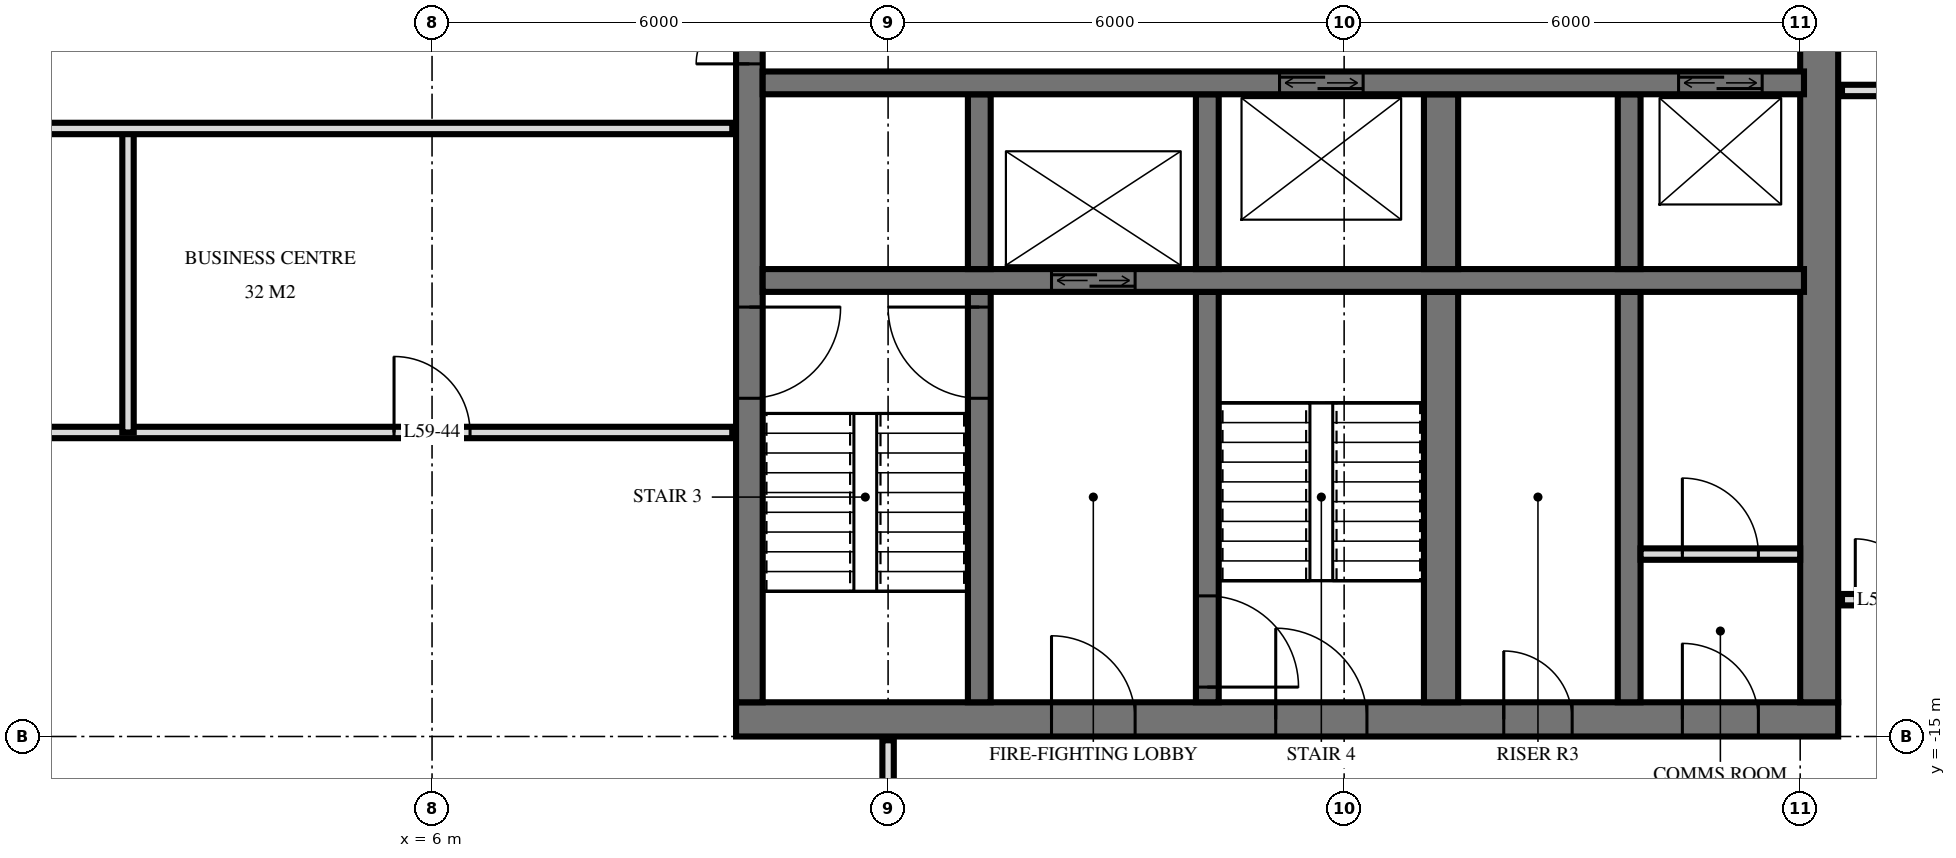
"""IFC4 building model, lengths in metres.
Left out: names, types, materials, properties, quantities, classifications, styles, units other than length and angle.
Written with IfcOpenShell. Run it as: python <this file> out.ifc"""

import sys

from ifc_helpers import new_model, si_unit, direction, frame, frame_2d, origin, place, context, subcontext, project, spatial, rectangle, extrude, element, fill, save


model = new_model("IFC4")
c1 = context("Model", 3, precision=1e-05, world=origin(), true_north=direction((0.0, 1.0)))
c2 = subcontext(c1, "Body", "Model", "MODEL_VIEW")
j1 = project(units=[si_unit("LENGTHUNIT", "METRE"), si_unit("PLANEANGLEUNIT", "RADIAN")], contexts=[c1])
p1 = place(None, origin())
s1 = spatial("IfcSite", under=j1, at=p1, CompositionType="ELEMENT")
p2 = place(p1, origin())
s2 = spatial("IfcBuilding", under=s1, at=p2, CompositionType="ELEMENT")
p3 = place(p2, frame((0.0, 0.0, 225.6)))
s3 = spatial("IfcBuildingStorey", under=s2, at=p3, CompositionType="ELEMENT", Elevation=225.6)
p4 = place(p3, frame((10.0, -14.775, 0.0), z_axis=(0.0, 0.0, 1.0), x_axis=(1.0, 0.0, 0.0)))
e1 = element("IfcWall", 1, at=p4, inside=s3, PredefinedType="SHEAR", context=c2, shape_type="SweptSolid", body=[
    extrude(rectangle(XDim=14.5, YDim=0.45, at=frame_2d((7.25, 0.0))), origin(), (0.0, 0.0, 1.0), 3.5),
])
p5 = place(p4, frame((7.1, 0.0, 0.0)))
e2 = element("IfcOpeningElement", 2, at=p5, cuts=e1, PredefinedType="OPENING", context=c2, shape_type="SweptSolid", body=[
    extrude(rectangle(XDim=1.2, YDim=2.1, at=frame_2d((0.6, 1.05))), frame((0.0, 0.235, 0.0), z_axis=(0.0, -1.0, 0.0), x_axis=(1.0, 0.0, 0.0)), (0.0, 0.0, 1.0), 0.47),
])
p6 = place(p4, frame((4.15, 0.0, 0.0)))
e3 = element("IfcOpeningElement", 3, at=p6, cuts=e1, PredefinedType="OPENING", context=c2, shape_type="SweptSolid", body=[
    extrude(rectangle(XDim=1.1, YDim=2.1, at=frame_2d((0.55, 1.05))), frame((0.0, 0.235, 0.0), z_axis=(0.0, -1.0, 0.0), x_axis=(1.0, 0.0, 0.0)), (0.0, 0.0, 1.0), 0.47),
])
p7 = place(p4, frame((10.1, 0.0, 0.0)))
e4 = element("IfcOpeningElement", 4, at=p7, cuts=e1, PredefinedType="OPENING", context=c2, shape_type="SweptSolid", body=[
    extrude(rectangle(XDim=0.9, YDim=2.1, at=frame_2d((0.45, 1.05))), frame((0.0, 0.235, 0.0), z_axis=(0.0, -1.0, 0.0), x_axis=(1.0, 0.0, 0.0)), (0.0, 0.0, 1.0), 0.47),
])
p8 = place(p4, frame((12.45, 0.0, 0.0)))
e5 = element("IfcOpeningElement", 5, at=p8, cuts=e1, PredefinedType="OPENING", context=c2, shape_type="SweptSolid", body=[
    extrude(rectangle(XDim=1.0, YDim=2.1, at=frame_2d((0.5, 1.05))), frame((0.0, 0.235, 0.0), z_axis=(0.0, -1.0, 0.0), x_axis=(1.0, 0.0, 0.0)), (0.0, 0.0, 1.0), 0.47),
])
p9 = place(p3, frame((10.175, -14.55, 0.0), z_axis=(0.0, 0.0, 1.0), x_axis=(0.0, 1.0, 0.0)))
e6 = element("IfcWall", 6, at=p9, inside=s3, PredefinedType="SHEAR", context=c2, shape_type="SweptSolid", body=[
    extrude(rectangle(XDim=14.1, YDim=0.35, at=frame_2d((7.05, 0.0))), origin(), (0.0, 0.0, 1.0), 3.5),
])
p10 = place(p9, frame((8.4, 0.0, 0.0)))
e7 = element("IfcOpeningElement", 7, at=p10, cuts=e6, PredefinedType="OPENING", context=c2, shape_type="SweptSolid", body=[
    extrude(rectangle(XDim=1.4, YDim=2.4, at=frame_2d((0.7, 1.2))), frame((0.0, 0.185, 0.0), z_axis=(0.0, -1.0, 0.0), x_axis=(1.0, 0.0, 0.0)), (0.0, 0.0, 1.0), 0.37),
])
p11 = place(p9, frame((10.0, 0.0, 0.0)))
e8 = element("IfcOpeningElement", 8, at=p11, cuts=e6, PredefinedType="OPENING", context=c2, shape_type="SweptSolid", body=[
    extrude(rectangle(XDim=1.4, YDim=2.4, at=frame_2d((0.7, 1.2))), frame((0.0, 0.185, 0.0), z_axis=(0.0, -1.0, 0.0), x_axis=(1.0, 0.0, 0.0)), (0.0, 0.0, 1.0), 0.37),
])
p12 = place(p9, frame((4.0, 0.0, 0.0)))
e9 = element("IfcOpeningElement", 9, at=p12, cuts=e6, PredefinedType="OPENING", context=c2, shape_type="SweptSolid", body=[
    extrude(rectangle(XDim=1.2, YDim=2.1, at=frame_2d((0.6, 1.05))), frame((0.0, 0.185, 0.0), z_axis=(0.0, -1.0, 0.0), x_axis=(1.0, 0.0, 0.0)), (0.0, 0.0, 1.0), 0.37),
])
p13 = place(p3, frame((24.25, -14.55, 0.0), z_axis=(0.0, 0.0, 1.0), x_axis=(0.0, 1.0, 0.0)))
e10 = element("IfcWall", 10, at=p13, inside=s3, PredefinedType="SHEAR", context=c2, shape_type="SweptSolid", body=[
    extrude(rectangle(XDim=14.1, YDim=0.5, at=frame_2d((7.05, 0.0))), origin(), (0.0, 0.0, 1.0), 3.5),
])
p14 = place(p3, frame((10.35, -6.4, 0.0), z_axis=(0.0, 0.0, 1.0), x_axis=(1.0, 0.0, 0.0)))
e11 = element("IfcWall", 11, at=p14, inside=s3, PredefinedType="SHEAR", context=c2, shape_type="SweptSolid", body=[
    extrude(rectangle(XDim=13.7, YDim=0.3, at=frame_2d((6.85, 0.0))), origin(), (0.0, 0.0, 1.0), 3.5),
])
p15 = place(p14, frame((12.05, 0.0, 0.0)))
e12 = element("IfcOpeningElement", 12, at=p15, cuts=e11, PredefinedType="OPENING", context=c2, shape_type="SweptSolid", body=[
    extrude(rectangle(XDim=1.1, YDim=2.1, at=frame_2d((0.55, 1.05))), frame((0.0, 0.16, 0.0), z_axis=(0.0, -1.0, 0.0), x_axis=(1.0, 0.0, 0.0)), (0.0, 0.0, 1.0), 0.32),
])
p16 = place(p14, frame((6.8, 0.0, 0.0)))
e13 = element("IfcOpeningElement", 13, at=p16, cuts=e11, PredefinedType="OPENING", context=c2, shape_type="SweptSolid", body=[
    extrude(rectangle(XDim=1.1, YDim=2.1, at=frame_2d((0.55, 1.05))), frame((0.0, 0.16, 0.0), z_axis=(0.0, -1.0, 0.0), x_axis=(1.0, 0.0, 0.0)), (0.0, 0.0, 1.0), 0.32),
])
p17 = place(p3, frame((10.35, -9.0, 0.0), z_axis=(0.0, 0.0, 1.0), x_axis=(1.0, 0.0, 0.0)))
e14 = element("IfcWall", 14, at=p17, inside=s3, PredefinedType="SHEAR", context=c2, shape_type="SweptSolid", body=[
    extrude(rectangle(XDim=13.7, YDim=0.3, at=frame_2d((6.85, 0.0))), origin(), (0.0, 0.0, 1.0), 3.5),
])
p18 = place(p17, frame((3.8, 0.0, 0.0)))
e15 = element("IfcOpeningElement", 15, at=p18, cuts=e14, PredefinedType="OPENING", context=c2, shape_type="SweptSolid", body=[
    extrude(rectangle(XDim=1.1, YDim=2.1, at=frame_2d((0.55, 1.05))), frame((0.0, 0.16, 0.0), z_axis=(0.0, -1.0, 0.0), x_axis=(1.0, 0.0, 0.0)), (0.0, 0.0, 1.0), 0.32),
])
p19 = place(p3, frame((13.2, -8.85, 0.0), z_axis=(0.0, 0.0, 1.0), x_axis=(0.0, 1.0, 0.0)))
e16 = element("IfcWall", 16, at=p19, inside=s3, PredefinedType="SHEAR", context=c2, shape_type="SweptSolid", body=[
    extrude(rectangle(XDim=2.3, YDim=0.3, at=frame_2d((1.15, 0.0))), origin(), (0.0, 0.0, 1.0), 3.5),
])
p20 = place(p3, frame((13.2, -14.55, 0.0), z_axis=(0.0, 0.0, 1.0), x_axis=(0.0, 1.0, 0.0)))
e17 = element("IfcWall", 17, at=p20, inside=s3, PredefinedType="SHEAR", context=c2, shape_type="SweptSolid", body=[
    extrude(rectangle(XDim=5.4, YDim=0.3, at=frame_2d((2.7, 0.0))), origin(), (0.0, 0.0, 1.0), 3.5),
])
p21 = place(p20, frame((4.0, 0.0, 0.0)))
e18 = element("IfcOpeningElement", 18, at=p21, cuts=e17, PredefinedType="OPENING", context=c2, shape_type="SweptSolid", body=[
    extrude(rectangle(XDim=1.2, YDim=2.1, at=frame_2d((0.6, 1.05))), frame((0.0, 0.16, 0.0), z_axis=(0.0, -1.0, 0.0), x_axis=(1.0, 0.0, 0.0)), (0.0, 0.0, 1.0), 0.32),
])
p22 = place(p3, frame((16.2, -8.85, 0.0), z_axis=(0.0, 0.0, 1.0), x_axis=(0.0, 1.0, 0.0)))
e19 = element("IfcWall", 19, at=p22, inside=s3, PredefinedType="SHEAR", context=c2, shape_type="SweptSolid", body=[
    extrude(rectangle(XDim=2.3, YDim=0.3, at=frame_2d((1.15, 0.0))), origin(), (0.0, 0.0, 1.0), 3.5),
])
p23 = place(p3, frame((16.2, -14.55, 0.0), z_axis=(0.0, 0.0, 1.0), x_axis=(0.0, 1.0, 0.0)))
e20 = element("IfcWall", 20, at=p23, inside=s3, PredefinedType="SHEAR", context=c2, shape_type="SweptSolid", body=[
    extrude(rectangle(XDim=5.4, YDim=0.3, at=frame_2d((2.7, 0.0))), origin(), (0.0, 0.0, 1.0), 3.5),
])
p24 = place(p23, frame((0.2, 0.0, 0.0)))
e21 = element("IfcOpeningElement", 21, at=p24, cuts=e20, PredefinedType="OPENING", context=c2, shape_type="SweptSolid", body=[
    extrude(rectangle(XDim=1.2, YDim=2.1, at=frame_2d((0.6, 1.05))), frame((0.0, 0.16, 0.0), z_axis=(0.0, -1.0, 0.0), x_axis=(1.0, 0.0, 0.0)), (0.0, 0.0, 1.0), 0.32),
])
p25 = place(p3, frame((19.275, -8.85, 0.0), z_axis=(0.0, 0.0, 1.0), x_axis=(0.0, 1.0, 0.0)))
e22 = element("IfcWall", 22, at=p25, inside=s3, PredefinedType="SHEAR", context=c2, shape_type="SweptSolid", body=[
    extrude(rectangle(XDim=2.3, YDim=0.45, at=frame_2d((1.15, 0.0))), origin(), (0.0, 0.0, 1.0), 3.5),
])
p26 = place(p3, frame((19.275, -14.55, 0.0), z_axis=(0.0, 0.0, 1.0), x_axis=(0.0, 1.0, 0.0)))
e23 = element("IfcWall", 23, at=p26, inside=s3, PredefinedType="SHEAR", context=c2, shape_type="SweptSolid", body=[
    extrude(rectangle(XDim=5.4, YDim=0.45, at=frame_2d((2.7, 0.0))), origin(), (0.0, 0.0, 1.0), 3.5),
])
p27 = place(p3, frame((21.75, -8.85, 0.0), z_axis=(0.0, 0.0, 1.0), x_axis=(0.0, 1.0, 0.0)))
e24 = element("IfcWall", 24, at=p27, inside=s3, PredefinedType="SHEAR", context=c2, shape_type="SweptSolid", body=[
    extrude(rectangle(XDim=2.3, YDim=0.3, at=frame_2d((1.15, 0.0))), origin(), (0.0, 0.0, 1.0), 3.5),
])
p28 = place(p3, frame((21.75, -14.55, 0.0), z_axis=(0.0, 0.0, 1.0), x_axis=(0.0, 1.0, 0.0)))
e25 = element("IfcWall", 25, at=p28, inside=s3, PredefinedType="SHEAR", context=c2, shape_type="SweptSolid", body=[
    extrude(rectangle(XDim=5.4, YDim=0.3, at=frame_2d((2.7, 0.0))), origin(), (0.0, 0.0, 1.0), 3.5),
])
p29 = place(p3, frame((21.9, -12.6, 0.0), z_axis=(0.0, 0.0, 1.0), x_axis=(1.0, 0.0, 0.0)))
e26 = element("IfcWall", 26, at=p29, inside=s3, PredefinedType="PARTITIONING", context=c2, shape_type="SweptSolid", body=[
    extrude(rectangle(XDim=2.1, YDim=0.15, at=frame_2d((1.05, 0.0))), origin(), (0.0, 0.0, 1.0), 3.2),
])
p30 = place(p29, frame((0.55, 0.0, 0.0)))
e27 = element("IfcOpeningElement", 27, at=p30, cuts=e26, PredefinedType="OPENING", context=c2, shape_type="SweptSolid", body=[
    extrude(rectangle(XDim=1.0, YDim=2.1, at=frame_2d((0.5, 1.05))), frame((0.0, 0.085, 0.0), z_axis=(0.0, -1.0, 0.0), x_axis=(1.0, 0.0, 0.0)), (0.0, 0.0, 1.0), 0.17),
])
p31 = place(p3, frame((12.0, -18.0, 0.0), z_axis=(0.0, 0.0, 1.0), x_axis=(0.0, 1.0, 0.0)))
e28 = element("IfcWall", 28, at=p31, inside=s3, PredefinedType="PARTITIONING", context=c2, shape_type="SweptSolid", body=[
    extrude(rectangle(XDim=2.95, YDim=0.15, at=frame_2d((1.475, 0.0))), origin(), (0.0, 0.0, 1.0), 3.22),
])
p32 = place(p31, frame((1.0, 0.0, 0.0)))
e29 = element("IfcOpeningElement", 29, at=p32, cuts=e28, PredefinedType="OPENING", context=c2, shape_type="SweptSolid", body=[
    extrude(rectangle(XDim=1.0, YDim=2.1, at=frame_2d((0.5, 1.05))), frame((0.0, 0.085, 0.0), z_axis=(0.0, -1.0, 0.0), x_axis=(1.0, 0.0, 0.0)), (0.0, 0.0, 1.0), 0.17),
])
p33 = place(p3, frame((2.0, -11.0, 0.0), z_axis=(0.0, 0.0, 1.0), x_axis=(0.0, 1.0, 0.0)))
e30 = element("IfcWall", 30, at=p33, inside=s3, PredefinedType="PARTITIONING", context=c2, shape_type="SweptSolid", body=[
    extrude(rectangle(XDim=4.0, YDim=0.15, at=frame_2d((2.0, 0.0))), origin(), (0.0, 0.0, 1.0), 3.22),
])
p34 = place(p3, frame((24.55, -13.2, 0.0), z_axis=(0.0, 0.0, 1.0), x_axis=(1.0, 0.0, 0.0)))
e31 = element("IfcWall", 31, at=p34, inside=s3, PredefinedType="PARTITIONING", context=c2, shape_type="SweptSolid", body=[
    extrude(rectangle(XDim=1.15, YDim=0.15, at=frame_2d((0.575, 0.0))), origin(), (0.0, 0.0, 1.0), 3.22),
])
p35 = place(p34, frame((0.175, 0.0, 0.0)))
e32 = element("IfcOpeningElement", 32, at=p35, cuts=e31, PredefinedType="OPENING", context=c2, shape_type="SweptSolid", body=[
    extrude(rectangle(XDim=0.8, YDim=2.1, at=frame_2d((0.4, 1.05))), frame((0.0, 0.085, 0.0), z_axis=(0.0, -1.0, 0.0), x_axis=(1.0, 0.0, 0.0)), (0.0, 0.0, 1.0), 0.17),
])
p36 = place(p3, frame((-9.95, -11.0, 0.0), z_axis=(0.0, 0.0, 1.0), x_axis=(1.0, 0.0, 0.0)))
e33 = element("IfcWall", 33, at=p36, inside=s3, PredefinedType="PARTITIONING", context=c2, shape_type="SweptSolid", body=[
    extrude(rectangle(XDim=19.9, YDim=0.15, at=frame_2d((9.95, 0.0))), origin(), (0.0, 0.0, 1.0), 3.22),
])
p37 = place(p36, frame((9.45, 0.0, 0.0)))
e34 = element("IfcOpeningElement", 34, at=p37, cuts=e33, PredefinedType="OPENING", context=c2, shape_type="SweptSolid", body=[
    extrude(rectangle(XDim=1.0, YDim=2.1, at=frame_2d((0.5, 1.05))), frame((0.0, 0.085, 0.0), z_axis=(0.0, -1.0, 0.0), x_axis=(1.0, 0.0, 0.0)), (0.0, 0.0, 1.0), 0.17),
])
p38 = place(p36, frame((15.45, 0.0, 0.0)))
e35 = element("IfcOpeningElement", 35, at=p38, cuts=e33, PredefinedType="OPENING", context=c2, shape_type="SweptSolid", body=[
    extrude(rectangle(XDim=1.0, YDim=2.1, at=frame_2d((0.5, 1.05))), frame((0.0, 0.085, 0.0), z_axis=(0.0, -1.0, 0.0), x_axis=(1.0, 0.0, 0.0)), (0.0, 0.0, 1.0), 0.17),
])
p39 = place(p3, frame((-9.95, -7.0, 0.0), z_axis=(0.0, 0.0, 1.0), x_axis=(1.0, 0.0, 0.0)))
e36 = element("IfcWall", 36, at=p39, inside=s3, PredefinedType="PARTITIONING", context=c2, shape_type="SweptSolid", body=[
    extrude(rectangle(XDim=19.9, YDim=0.15, at=frame_2d((9.95, 0.0))), origin(), (0.0, 0.0, 1.0), 3.22),
])
p40 = place(p39, frame((9.45, 0.0, 0.0)))
e37 = element("IfcOpeningElement", 37, at=p40, cuts=e36, PredefinedType="OPENING", context=c2, shape_type="SweptSolid", body=[
    extrude(rectangle(XDim=1.0, YDim=2.1, at=frame_2d((0.5, 1.05))), frame((0.0, 0.085, 0.0), z_axis=(0.0, -1.0, 0.0), x_axis=(1.0, 0.0, 0.0)), (0.0, 0.0, 1.0), 0.17),
])
p41 = place(p39, frame((3.45, 0.0, 0.0)))
e38 = element("IfcOpeningElement", 38, at=p41, cuts=e36, PredefinedType="OPENING", context=c2, shape_type="SweptSolid", body=[
    extrude(rectangle(XDim=1.0, YDim=2.1, at=frame_2d((0.5, 1.05))), frame((0.0, 0.085, 0.0), z_axis=(0.0, -1.0, 0.0), x_axis=(1.0, 0.0, 0.0)), (0.0, 0.0, 1.0), 0.17),
])
p42 = place(p3, frame((24.55, -6.5, 0.0), z_axis=(0.0, 0.0, 1.0), x_axis=(1.0, 0.0, 0.0)))
e39 = element("IfcWall", 39, at=p42, inside=s3, PredefinedType="PLUMBINGWALL", context=c2, shape_type="SweptSolid", body=[
    extrude(rectangle(XDim=2.27, YDim=0.15, at=frame_2d((1.135, 0.0))), origin(), (0.0, 0.0, 1.0), 3.22),
])
p43 = place(p42, frame((0.75, 0.0, 0.0)))
e40 = element("IfcOpeningElement", 40, at=p43, cuts=e39, PredefinedType="OPENING", context=c2, shape_type="SweptSolid", body=[
    extrude(rectangle(XDim=0.9, YDim=2.1, at=frame_2d((0.45, 1.05))), frame((0.0, 0.085, 0.0), z_axis=(0.0, -1.0, 0.0), x_axis=(1.0, 0.0, 0.0)), (0.0, 0.0, 1.0), 0.17),
])
p44 = place(p15, origin())
e41 = element("IfcDoor", 41, at=p44, inside=s3, OperationType="DOUBLE_DOOR_SLIDING", PredefinedType="USERDEFINED", context=c2, shape_type="SweptSolid", body=[
    extrude(rectangle(XDim=1.1, YDim=2.1, at=frame_2d((0.55, 1.05))), frame((0.0, 0.025, 0.0), z_axis=(0.0, -1.0, 0.0), x_axis=(1.0, 0.0, 0.0)), (0.0, 0.0, 1.0), 0.05),
])
fill(e12, e41)
p45 = place(p18, origin())
e42 = element("IfcDoor", 42, at=p45, inside=s3, OperationType="DOUBLE_DOOR_SLIDING", PredefinedType="USERDEFINED", context=c2, shape_type="SweptSolid", body=[
    extrude(rectangle(XDim=1.1, YDim=2.1, at=frame_2d((0.55, 1.05))), frame((0.0, 0.025, 0.0), z_axis=(0.0, -1.0, 0.0), x_axis=(1.0, 0.0, 0.0)), (0.0, 0.0, 1.0), 0.05),
])
fill(e15, e42)
p46 = place(p16, origin())
e43 = element("IfcDoor", 43, at=p46, inside=s3, OperationType="DOUBLE_DOOR_SLIDING", PredefinedType="USERDEFINED", context=c2, shape_type="SweptSolid", body=[
    extrude(rectangle(XDim=1.1, YDim=2.1, at=frame_2d((0.55, 1.05))), frame((0.0, 0.025, 0.0), z_axis=(0.0, -1.0, 0.0), x_axis=(1.0, 0.0, 0.0)), (0.0, 0.0, 1.0), 0.05),
])
fill(e13, e43)
p47 = place(p10, origin())
e44 = element("IfcDoor", 44, at=p47, inside=s3, OperationType="DOUBLE_DOOR_SINGLE_SWING", PredefinedType="DOOR", context=c2, shape_type="SweptSolid", body=[
    extrude(rectangle(XDim=1.4, YDim=2.4, at=frame_2d((0.7, 1.2))), frame((0.0, 0.025, 0.0), z_axis=(0.0, -1.0, 0.0), x_axis=(1.0, 0.0, 0.0)), (0.0, 0.0, 1.0), 0.05),
])
fill(e7, e44)
p48 = place(p12, frame((0.6, 0.0, 0.0), z_axis=(0.0, 0.0, 1.0), x_axis=(-1.0, 0.0, 0.0)))
e45 = element("IfcDoor", 45, at=p48, inside=s3, OperationType="SINGLE_SWING_RIGHT", PredefinedType="DOOR", context=c2, shape_type="SweptSolid", body=[
    extrude(rectangle(XDim=1.2, YDim=2.1, at=frame_2d((0.0, 1.05))), frame((0.0, -0.025, 0.0), z_axis=(0.0, 1.0, 0.0), x_axis=(-1.0, 0.0, 0.0)), (0.0, 0.0, 1.0), 0.05),
])
fill(e9, e45)
p49 = place(p5, origin())
e46 = element("IfcDoor", 46, at=p49, inside=s3, OperationType="SINGLE_SWING_RIGHT", PredefinedType="DOOR", context=c2, shape_type="SweptSolid", body=[
    extrude(rectangle(XDim=1.2, YDim=2.1, at=frame_2d((0.6, 1.05))), frame((0.0, 0.025, 0.0), z_axis=(0.0, -1.0, 0.0), x_axis=(1.0, 0.0, 0.0)), (0.0, 0.0, 1.0), 0.05),
])
fill(e2, e46)
p50 = place(p6, origin())
e47 = element("IfcDoor", 47, at=p50, inside=s3, OperationType="SINGLE_SWING_RIGHT", PredefinedType="DOOR", context=c2, shape_type="SweptSolid", body=[
    extrude(rectangle(XDim=1.1, YDim=2.1, at=frame_2d((0.55, 1.05))), frame((0.0, 0.025, 0.0), z_axis=(0.0, -1.0, 0.0), x_axis=(1.0, 0.0, 0.0)), (0.0, 0.0, 1.0), 0.05),
])
fill(e3, e47)
p51 = place(p7, origin())
e48 = element("IfcDoor", 48, at=p51, inside=s3, OperationType="SINGLE_SWING_RIGHT", PredefinedType="DOOR", context=c2, shape_type="SweptSolid", body=[
    extrude(rectangle(XDim=0.9, YDim=2.1, at=frame_2d((0.45, 1.05))), frame((0.0, 0.025, 0.0), z_axis=(0.0, -1.0, 0.0), x_axis=(1.0, 0.0, 0.0)), (0.0, 0.0, 1.0), 0.05),
])
fill(e4, e48)
p52 = place(p8, origin())
e49 = element("IfcDoor", 49, at=p52, inside=s3, OperationType="SINGLE_SWING_RIGHT", PredefinedType="DOOR", context=c2, shape_type="SweptSolid", body=[
    extrude(rectangle(XDim=1.0, YDim=2.1, at=frame_2d((0.5, 1.05))), frame((0.0, 0.025, 0.0), z_axis=(0.0, -1.0, 0.0), x_axis=(1.0, 0.0, 0.0)), (0.0, 0.0, 1.0), 0.05),
])
fill(e5, e49)
p53 = place(p21, origin())
e50 = element("IfcDoor", 50, at=p53, inside=s3, OperationType="SINGLE_SWING_LEFT", PredefinedType="DOOR", context=c2, shape_type="SweptSolid", body=[
    extrude(rectangle(XDim=1.2, YDim=2.1, at=frame_2d((0.6, 1.05))), frame((0.0, 0.025, 0.0), z_axis=(0.0, -1.0, 0.0), x_axis=(1.0, 0.0, 0.0)), (0.0, 0.0, 1.0), 0.05),
])
fill(e18, e50)
p54 = place(p24, frame((0.6, 0.0, 0.0), z_axis=(0.0, 0.0, 1.0), x_axis=(-1.0, 0.0, 0.0)))
e51 = element("IfcDoor", 51, at=p54, inside=s3, OperationType="SINGLE_SWING_LEFT", PredefinedType="DOOR", context=c2, shape_type="SweptSolid", body=[
    extrude(rectangle(XDim=1.2, YDim=2.1, at=frame_2d((0.0, 1.05))), frame((0.0, -0.025, 0.0), z_axis=(0.0, 1.0, 0.0), x_axis=(-1.0, 0.0, 0.0)), (0.0, 0.0, 1.0), 0.05),
])
fill(e21, e51)
p55 = place(p30, origin())
e52 = element("IfcDoor", 52, at=p55, inside=s3, OperationType="SINGLE_SWING_RIGHT", PredefinedType="DOOR", context=c2, shape_type="SweptSolid", body=[
    extrude(rectangle(XDim=1.0, YDim=2.1, at=frame_2d((0.5, 1.05))), frame((0.0, 0.025, 0.0), z_axis=(0.0, -1.0, 0.0), x_axis=(1.0, 0.0, 0.0)), (0.0, 0.0, 1.0), 0.05),
])
fill(e27, e52)
p56 = place(p35, origin())
e53 = element("IfcDoor", 53, at=p56, inside=s3, OperationType="SINGLE_SWING_RIGHT", PredefinedType="DOOR", context=c2, shape_type="SweptSolid", body=[
    extrude(rectangle(XDim=0.8, YDim=2.1, at=frame_2d((0.4, 1.05))), frame((0.0, 0.025, 0.0), z_axis=(0.0, -1.0, 0.0), x_axis=(1.0, 0.0, 0.0)), (0.0, 0.0, 1.0), 0.05),
])
fill(e32, e53)
p57 = place(p38, origin())
e54 = element("IfcDoor", 54, at=p57, inside=s3, OperationType="SINGLE_SWING_RIGHT", PredefinedType="DOOR", context=c2, shape_type="SweptSolid", body=[
    extrude(rectangle(XDim=1.0, YDim=2.1, at=frame_2d((0.5, 1.05))), frame((0.0, 0.025, 0.0), z_axis=(0.0, -1.0, 0.0), x_axis=(1.0, 0.0, 0.0)), (0.0, 0.0, 1.0), 0.05),
])
fill(e35, e54)
save(model, sys.argv[1])
